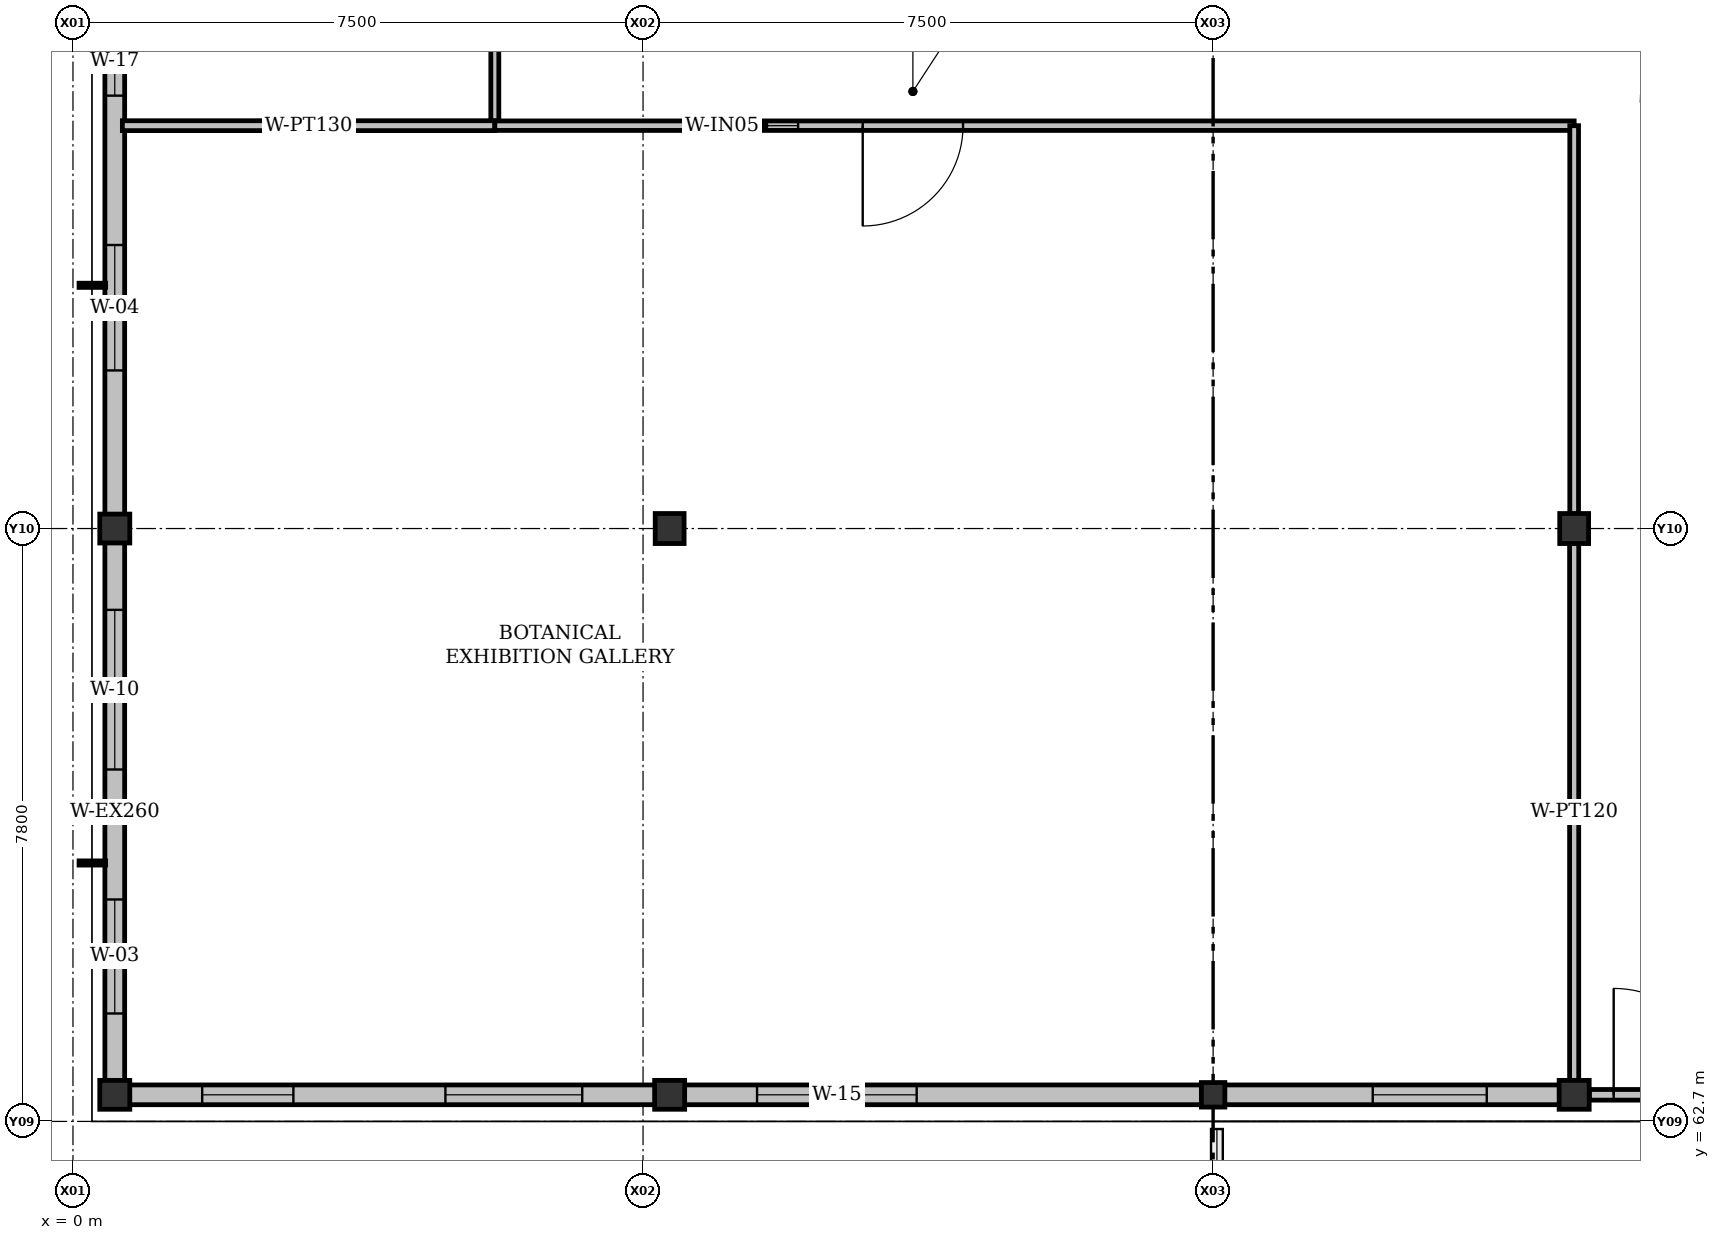
"""IFC4 building model, lengths in metres.
Left out: names, types, materials, properties, quantities, classifications, styles, units other than length and angle.
Written with IfcOpenShell. Run it as: python <this file> out.ifc"""

import sys

from ifc_helpers import new_model, si_unit, direction, frame, frame_2d, origin, origin_2d, place, context, subcontext, project, spatial, rectangle, i_section, extrude, element, fill, save


model = new_model("IFC4")
c1 = context("Model", 3, precision=1e-05, world=origin(), true_north=direction((0.0, 1.0)))
c2 = subcontext(c1, "Body", "Model", "MODEL_VIEW")
j1 = project(units=[si_unit("LENGTHUNIT", "METRE"), si_unit("PLANEANGLEUNIT", "RADIAN")], contexts=[c1])
p1 = place(None, origin())
s1 = spatial("IfcSite", under=j1, at=p1, CompositionType="ELEMENT")
p2 = place(p1, origin())
s2 = spatial("IfcBuilding", under=s1, at=p2, CompositionType="ELEMENT")
p3 = place(p2, frame((0.0, 0.0, 9.9)))
s3 = spatial("IfcBuildingStorey", under=s2, at=p3, CompositionType="ELEMENT", Elevation=9.9)
for number, where, z_axis, x_axis in (
    (1, (0.55, 63.05, 0.0), (0.0, 0.0, 1.0), (1.0, 0.0, 0.0)),
    (2, (7.85, 63.05, 0.0), (0.0, 0.0, 1.0), (1.0, 0.0, 0.0)),
    (3, (19.75, 63.05, 0.0), (0.0, 0.0, 1.0), (1.0, 0.0, 0.0)),
    (4, (0.55, 70.5, 0.0), (0.0, 0.0, 1.0), (1.0, 0.0, 0.0)),
    (5, (7.85, 70.5, 0.0), (0.0, 0.0, 1.0), (0.0, 1.0, 0.0)),
    (6, (19.75, 70.5, 0.0), (0.0, 0.0, 1.0), (0.0, 1.0, 0.0)),
):
    element("IfcColumn", number, at=place(p3, frame(where, z_axis=z_axis, x_axis=x_axis)), inside=s3, PredefinedType="COLUMN", context=c2, shape_type="SweptSolid", body=[
        extrude(i_section(OverallWidth=0.395, OverallDepth=0.38, WebThickness=0.019, FlangeThickness=0.03, FilletRadius=0.015, at=origin_2d()), origin(), (0.0, 0.0, 1.0), 4.2),
    ])
p4 = place(p3, frame((15.0, 63.05, 0.0), z_axis=(0.0, 0.0, 1.0), x_axis=(1.0, 0.0, 0.0)))
e7 = element("IfcColumn", 7, at=p4, inside=s3, PredefinedType="COLUMN", context=c2, shape_type="SweptSolid", body=[
    extrude(i_section(OverallWidth=0.309, OverallDepth=0.323, WebThickness=0.014, FlangeThickness=0.023, FilletRadius=0.015, at=origin_2d()), origin(), (0.0, 0.0, 1.0), 4.2),
])
p5 = place(p3, frame((0.55, 63.05, 0.0), z_axis=(0.0, 0.0, 1.0), x_axis=(0.0, 1.0, 0.0)))
e8 = element("IfcWall", 8, at=p5, inside=s3, PredefinedType="SOLIDWALL", context=c2, shape_type="SweptSolid", body=[
    extrude(rectangle(XDim=7.45, YDim=0.26, at=frame_2d((3.725, 0.0))), origin(), (0.0, 0.0, 1.0), 3.592),
])
p6 = place(p5, frame((1.07, 0.0, 0.92)))
e9 = element("IfcOpeningElement", 9, at=p6, cuts=e8, PredefinedType="OPENING", context=c2, shape_type="SweptSolid", body=[
    extrude(rectangle(XDim=1.5, YDim=1.4, at=frame_2d((0.75, 0.7))), frame((0.0, 0.13, 0.0), z_axis=(0.0, -1.0, 0.0), x_axis=(1.0, 0.0, 0.0)), (0.0, 0.0, 1.0), 0.26),
])
p7 = place(p5, frame((4.28, 0.0, 0.92)))
e10 = element("IfcOpeningElement", 10, at=p7, cuts=e8, PredefinedType="OPENING", context=c2, shape_type="SweptSolid", body=[
    extrude(rectangle(XDim=2.1, YDim=1.55, at=frame_2d((1.05, 0.775))), frame((0.0, 0.13, 0.0), z_axis=(0.0, -1.0, 0.0), x_axis=(1.0, 0.0, 0.0)), (0.0, 0.0, 1.0), 0.26),
])
p8 = place(p3, frame((0.55, 70.5, 0.0), z_axis=(0.0, 0.0, 1.0), x_axis=(0.0, 1.0, 0.0)))
e11 = element("IfcWall", 11, at=p8, inside=s3, PredefinedType="SOLIDWALL", context=c2, shape_type="SweptSolid", body=[
    extrude(rectangle(XDim=7.5, YDim=0.26, at=frame_2d((3.75, 0.0))), origin(), (0.0, 0.0, 1.0), 3.592),
])
p9 = place(p8, frame((2.08, 0.0, 0.92)))
e12 = element("IfcOpeningElement", 12, at=p9, cuts=e11, PredefinedType="OPENING", context=c2, shape_type="SweptSolid", body=[
    extrude(rectangle(XDim=1.65, YDim=1.4, at=frame_2d((0.825, 0.7))), frame((0.0, 0.13, 0.0), z_axis=(0.0, -1.0, 0.0), x_axis=(1.0, 0.0, 0.0)), (0.0, 0.0, 1.0), 0.26),
])
p10 = place(p8, frame((5.695, 0.0, 0.92)))
e13 = element("IfcOpeningElement", 13, at=p10, cuts=e11, PredefinedType="OPENING", context=c2, shape_type="SweptSolid", body=[
    extrude(rectangle(XDim=0.9, YDim=1.3, at=frame_2d((0.45, 0.65))), frame((0.0, 0.13, 0.0), z_axis=(0.0, -1.0, 0.0), x_axis=(1.0, 0.0, 0.0)), (0.0, 0.0, 1.0), 0.26),
])
p11 = place(p3, frame((7.85, 63.05, 0.0), z_axis=(0.0, 0.0, 1.0), x_axis=(-1.0, 0.0, 0.0)))
e14 = element("IfcWall", 14, at=p11, inside=s3, PredefinedType="SOLIDWALL", context=c2, shape_type="SweptSolid", body=[
    extrude(rectangle(XDim=7.3, YDim=0.26, at=frame_2d((3.65, 0.0))), origin(), (0.0, 0.0, 1.0), 3.592),
])
p12 = place(p11, frame((1.15, 0.0, 0.92)))
e15 = element("IfcOpeningElement", 15, at=p12, cuts=e14, PredefinedType="OPENING", context=c2, shape_type="SweptSolid", body=[
    extrude(rectangle(XDim=1.8, YDim=1.4, at=frame_2d((0.9, 0.7))), frame((0.0, 0.13, 0.0), z_axis=(0.0, -1.0, 0.0), x_axis=(1.0, 0.0, 0.0)), (0.0, 0.0, 1.0), 0.26),
])
p13 = place(p11, frame((4.95, 0.0, 0.92)))
e16 = element("IfcOpeningElement", 16, at=p13, cuts=e14, PredefinedType="OPENING", context=c2, shape_type="SweptSolid", body=[
    extrude(rectangle(XDim=1.2, YDim=1.7, at=frame_2d((0.6, 0.85))), frame((0.0, 0.13, 0.0), z_axis=(0.0, -1.0, 0.0), x_axis=(1.0, 0.0, 0.0)), (0.0, 0.0, 1.0), 0.26),
])
p14 = place(p3, frame((19.75, 63.05, 0.0), z_axis=(0.0, 0.0, 1.0), x_axis=(-1.0, 0.0, 0.0)))
e17 = element("IfcWall", 17, at=p14, inside=s3, PredefinedType="SOLIDWALL", context=c2, shape_type="SweptSolid", body=[
    extrude(rectangle(XDim=11.9, YDim=0.26, at=frame_2d((5.95, 0.0))), origin(), (0.0, 0.0, 1.0), 3.592),
])
p15 = place(p14, frame((1.15, 0.0, 0.92)))
e18 = element("IfcOpeningElement", 18, at=p15, cuts=e17, PredefinedType="OPENING", context=c2, shape_type="SweptSolid", body=[
    extrude(rectangle(XDim=1.5, YDim=1.55, at=frame_2d((0.75, 0.775))), frame((0.0, 0.13, 0.0), z_axis=(0.0, -1.0, 0.0), x_axis=(1.0, 0.0, 0.0)), (0.0, 0.0, 1.0), 0.26),
])
p16 = place(p14, frame((8.65, 0.0, 0.92)))
e19 = element("IfcOpeningElement", 19, at=p16, cuts=e17, PredefinedType="OPENING", context=c2, shape_type="SweptSolid", body=[
    extrude(rectangle(XDim=2.1, YDim=1.7, at=frame_2d((1.05, 0.85))), frame((0.0, 0.13, 0.0), z_axis=(0.0, -1.0, 0.0), x_axis=(1.0, 0.0, 0.0)), (0.0, 0.0, 1.0), 0.26),
])
p17 = place(p3, frame((5.55, 75.8, 0.0), z_axis=(0.0, 0.0, 1.0), x_axis=(0.0, 1.0, 0.0)))
e20 = element("IfcWall", 20, at=p17, inside=s3, PredefinedType="PARTITIONING", context=c2, shape_type="SweptSolid", body=[
    extrude(rectangle(XDim=9.4, YDim=0.105, at=frame_2d((4.7, 0.0))), origin(), (0.0, 0.0, 1.0), 3.466),
])
p18 = place(p17, frame((3.725, 0.0, 0.0)))
e21 = element("IfcOpeningElement", 21, at=p18, cuts=e20, PredefinedType="OPENING", context=c2, shape_type="SweptSolid", body=[
    extrude(rectangle(XDim=1.95, YDim=2.4, at=frame_2d((0.975, 1.2))), frame((0.0, 0.052, 0.0), z_axis=(0.0, -1.0, 0.0), x_axis=(1.0, 0.0, 0.0)), (0.0, 0.0, 1.0), 0.105),
])
p19 = place(p17, frame((6.525, 0.0, 0.92)))
e22 = element("IfcOpeningElement", 22, at=p19, cuts=e20, PredefinedType="OPENING", context=c2, shape_type="SweptSolid", body=[
    extrude(rectangle(XDim=1.1, YDim=1.1, at=frame_2d((0.55, 0.55))), frame((0.0, 0.052, 0.0), z_axis=(0.0, -1.0, 0.0), x_axis=(1.0, 0.0, 0.0)), (0.0, 0.0, 1.0), 0.105),
])
p20 = place(p3, frame((19.95, 63.05, 0.0), z_axis=(0.0, 0.0, 1.0), x_axis=(1.0, 0.0, 0.0)))
e23 = element("IfcWall", 23, at=p20, inside=s3, PredefinedType="PARTITIONING", context=c2, shape_type="SweptSolid", body=[
    extrude(rectangle(XDim=2.04, YDim=0.14, at=frame_2d((1.02, 0.0))), origin(), (0.0, 0.0, 1.0), 3.592),
])
p21 = place(p20, frame((0.32, 0.0, 0.0)))
e24 = element("IfcOpeningElement", 24, at=p21, cuts=e23, PredefinedType="OPENING", context=c2, shape_type="SweptSolid", body=[
    extrude(rectangle(XDim=1.4, YDim=2.25, at=frame_2d((0.7, 1.125))), frame((0.0, 0.07, 0.0), z_axis=(0.0, -1.0, 0.0), x_axis=(1.0, 0.0, 0.0)), (0.0, 0.0, 1.0), 0.14),
])
p22 = place(p3, frame((0.65, 75.8, 0.0), z_axis=(0.0, 0.0, 1.0), x_axis=(1.0, 0.0, 0.0)))
e25 = element("IfcWall", 25, at=p22, inside=s3, PredefinedType="PARTITIONING", context=c2, shape_type="SweptSolid", body=[
    extrude(rectangle(XDim=4.9, YDim=0.13, at=frame_2d((2.45, 0.0))), origin(), (0.0, 0.0, 1.0), 3.95),
])
p23 = place(p3, frame((19.75, 75.8, 0.0), z_axis=(0.0, 0.0, 1.0), x_axis=(-1.0, 0.0, 0.0)))
e26 = element("IfcWall", 26, at=p23, inside=s3, PredefinedType="PARTITIONING", context=c2, shape_type="SweptSolid", body=[
    extrude(rectangle(XDim=14.2, YDim=0.125, at=frame_2d((7.1, 0.0))), origin(), (0.0, 0.0, 1.0), 3.542),
])
p24 = place(p23, frame((8.04, 0.0, 0.0)))
e27 = element("IfcOpeningElement", 27, at=p24, cuts=e26, PredefinedType="OPENING", context=c2, shape_type="SweptSolid", body=[
    extrude(rectangle(XDim=1.32, YDim=2.18, at=frame_2d((0.66, 1.09))), frame((0.0, 0.062, 0.0), z_axis=(0.0, -1.0, 0.0), x_axis=(1.0, 0.0, 0.0)), (0.0, 0.0, 1.0), 0.125),
])
p25 = place(p23, frame((10.21, 0.0, 0.92)))
e28 = element("IfcOpeningElement", 28, at=p25, cuts=e26, PredefinedType="OPENING", context=c2, shape_type="SweptSolid", body=[
    extrude(rectangle(XDim=0.9, YDim=1.2, at=frame_2d((0.45, 0.6))), frame((0.0, 0.062, 0.0), z_axis=(0.0, -1.0, 0.0), x_axis=(1.0, 0.0, 0.0)), (0.0, 0.0, 1.0), 0.125),
])
p26 = place(p3, frame((19.75, 63.235, 0.0), z_axis=(0.0, 0.0, 1.0), x_axis=(0.0, 1.0, 0.0)))
e29 = element("IfcWall", 29, at=p26, inside=s3, PredefinedType="PARTITIONING", context=c2, shape_type="SweptSolid", body=[
    extrude(rectangle(XDim=7.073, YDim=0.12, at=frame_2d((3.536, 0.0))), origin(), (0.0, 0.0, 1.0), 3.542),
])
p27 = place(p3, frame((19.75, 70.692, 0.0), z_axis=(0.0, 0.0, 1.0), x_axis=(0.0, 1.0, 0.0)))
e30 = element("IfcWall", 30, at=p27, inside=s3, PredefinedType="PARTITIONING", context=c2, shape_type="SweptSolid", body=[
    extrude(rectangle(XDim=5.108, YDim=0.115, at=frame_2d((2.554, 0.0))), origin(), (0.0, 0.0, 1.0), 3.542),
])
p28 = place(p6, origin())
e31 = element("IfcWindow", 31, at=p28, inside=s3, PartitioningType="SINGLE_PANEL", PredefinedType="WINDOW", context=c2, shape_type="SweptSolid", body=[
    extrude(rectangle(XDim=1.5, YDim=1.4, at=frame_2d((0.75, 0.7))), frame((0.0, 0.03, 0.0), z_axis=(0.0, -1.0, 0.0), x_axis=(1.0, 0.0, 0.0)), (0.0, 0.0, 1.0), 0.06),
])
fill(e9, e31)
p29 = place(p7, origin())
e32 = element("IfcWindow", 32, at=p29, inside=s3, PartitioningType="DOUBLE_PANEL_VERTICAL", PredefinedType="WINDOW", context=c2, shape_type="SweptSolid", body=[
    extrude(rectangle(XDim=2.1, YDim=1.55, at=frame_2d((1.05, 0.775))), frame((0.0, 0.03, 0.0), z_axis=(0.0, -1.0, 0.0), x_axis=(1.0, 0.0, 0.0)), (0.0, 0.0, 1.0), 0.06),
])
fill(e10, e32)
p30 = place(p9, origin())
e33 = element("IfcWindow", 33, at=p30, inside=s3, PartitioningType="DOUBLE_PANEL_VERTICAL", PredefinedType="WINDOW", context=c2, shape_type="SweptSolid", body=[
    extrude(rectangle(XDim=1.65, YDim=1.4, at=frame_2d((0.825, 0.7))), frame((0.0, 0.03, 0.0), z_axis=(0.0, -1.0, 0.0), x_axis=(1.0, 0.0, 0.0)), (0.0, 0.0, 1.0), 0.06),
])
fill(e12, e33)
p31 = place(p10, origin())
e34 = element("IfcWindow", 34, at=p31, inside=s3, PartitioningType="SINGLE_PANEL", PredefinedType="WINDOW", context=c2, shape_type="SweptSolid", body=[
    extrude(rectangle(XDim=0.9, YDim=1.3, at=frame_2d((0.45, 0.65))), frame((0.0, 0.03, 0.0), z_axis=(0.0, -1.0, 0.0), x_axis=(1.0, 0.0, 0.0)), (0.0, 0.0, 1.0), 0.06),
])
fill(e13, e34)
p32 = place(p12, origin())
e35 = element("IfcWindow", 35, at=p32, inside=s3, PartitioningType="DOUBLE_PANEL_VERTICAL", PredefinedType="WINDOW", context=c2, shape_type="SweptSolid", body=[
    extrude(rectangle(XDim=1.8, YDim=1.4, at=frame_2d((0.9, 0.7))), frame((0.0, 0.03, 0.0), z_axis=(0.0, -1.0, 0.0), x_axis=(1.0, 0.0, 0.0)), (0.0, 0.0, 1.0), 0.06),
])
fill(e15, e35)
p33 = place(p13, origin())
e36 = element("IfcWindow", 36, at=p33, inside=s3, PartitioningType="SINGLE_PANEL", PredefinedType="WINDOW", context=c2, shape_type="SweptSolid", body=[
    extrude(rectangle(XDim=1.2, YDim=1.7, at=frame_2d((0.6, 0.85))), frame((0.0, 0.03, 0.0), z_axis=(0.0, -1.0, 0.0), x_axis=(1.0, 0.0, 0.0)), (0.0, 0.0, 1.0), 0.06),
])
fill(e16, e36)
p34 = place(p15, origin())
e37 = element("IfcWindow", 37, at=p34, inside=s3, PartitioningType="SINGLE_PANEL", PredefinedType="WINDOW", context=c2, shape_type="SweptSolid", body=[
    extrude(rectangle(XDim=1.5, YDim=1.55, at=frame_2d((0.75, 0.775))), frame((0.0, 0.03, 0.0), z_axis=(0.0, -1.0, 0.0), x_axis=(1.0, 0.0, 0.0)), (0.0, 0.0, 1.0), 0.06),
])
fill(e18, e37)
p35 = place(p16, origin())
e38 = element("IfcWindow", 38, at=p35, inside=s3, PartitioningType="DOUBLE_PANEL_VERTICAL", PredefinedType="WINDOW", context=c2, shape_type="SweptSolid", body=[
    extrude(rectangle(XDim=2.1, YDim=1.7, at=frame_2d((1.05, 0.85))), frame((0.0, 0.03, 0.0), z_axis=(0.0, -1.0, 0.0), x_axis=(1.0, 0.0, 0.0)), (0.0, 0.0, 1.0), 0.06),
])
fill(e19, e38)
p36 = place(p21, origin())
e39 = element("IfcDoor", 39, at=p36, inside=s3, OperationType="SINGLE_SWING_LEFT", PredefinedType="DOOR", context=c2, shape_type="SweptSolid", body=[
    extrude(rectangle(XDim=1.4, YDim=2.25, at=frame_2d((0.7, 1.125))), frame((0.0, 0.025, 0.0), z_axis=(0.0, -1.0, 0.0), x_axis=(1.0, 0.0, 0.0)), (0.0, 0.0, 1.0), 0.05),
])
fill(e24, e39)
p37 = place(p24, origin())
e40 = element("IfcDoor", 40, at=p37, inside=s3, OperationType="SINGLE_SWING_RIGHT", PredefinedType="DOOR", context=c2, shape_type="SweptSolid", body=[
    extrude(rectangle(XDim=1.32, YDim=2.18, at=frame_2d((0.66, 1.09))), frame((0.0, 0.025, 0.0), z_axis=(0.0, -1.0, 0.0), x_axis=(1.0, 0.0, 0.0)), (0.0, 0.0, 1.0), 0.05),
])
fill(e27, e40)
p38 = place(p25, origin())
e41 = element("IfcWindow", 41, at=p38, inside=s3, PartitioningType="SINGLE_PANEL", PredefinedType="WINDOW", context=c2, shape_type="SweptSolid", body=[
    extrude(rectangle(XDim=0.9, YDim=1.2, at=frame_2d((0.45, 0.6))), frame((0.0, 0.03, 0.0), z_axis=(0.0, -1.0, 0.0), x_axis=(1.0, 0.0, 0.0)), (0.0, 0.0, 1.0), 0.06),
])
fill(e28, e41)
save(model, sys.argv[1])
